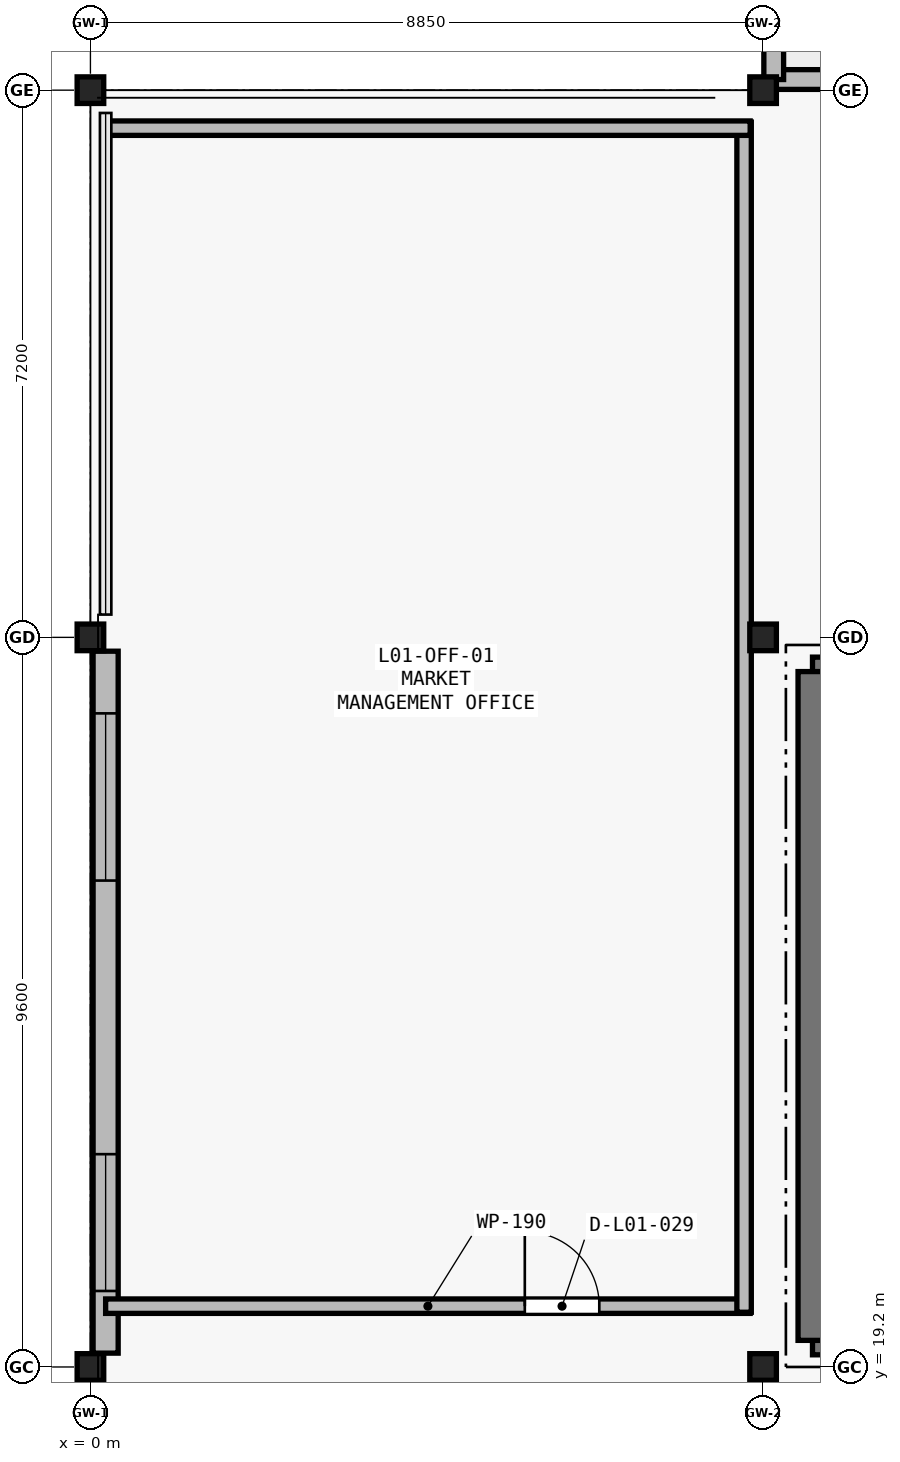
"""IFC4 building model, lengths in metres.
Left out: names, types, materials, properties, quantities, classifications, styles, units other than length and angle.
Written with IfcOpenShell. Run it as: python <this file> out.ifc"""

import sys

from ifc_helpers import new_model, si_unit, direction, frame, frame_2d, origin, origin_2d, place, context, subcontext, project, spatial, rectangle, i_section, extrude, element, fill, save


model = new_model("IFC4")
c1 = context("Model", 3, precision=1e-05, world=origin(), true_north=direction((0.0, 1.0)))
c2 = subcontext(c1, "Body", "Model", "MODEL_VIEW")
j1 = project(units=[si_unit("LENGTHUNIT", "METRE"), si_unit("PLANEANGLEUNIT", "RADIAN")], contexts=[c1])
p1 = place(None, origin())
s1 = spatial("IfcSite", under=j1, at=p1, CompositionType="ELEMENT")
p2 = place(p1, origin())
s2 = spatial("IfcBuilding", under=s1, at=p2, CompositionType="ELEMENT")
p3 = place(p2, frame((0.0, 0.0, 6.0)))
s3 = spatial("IfcBuildingStorey", under=s2, at=p3, CompositionType="ELEMENT", Elevation=6.0)
for number, where, z_axis, x_axis in (
    (1, (0.0, 19.2, 0.0), (0.0, 0.0, 1.0), (1.0, 0.0, 0.0)),
    (2, (0.0, 28.8, 0.0), (0.0, 0.0, 1.0), (1.0, 0.0, 0.0)),
    (3, (0.0, 36.0, 0.0), (0.0, 0.0, 1.0), (1.0, 0.0, 0.0)),
    (4, (8.85, 19.2, 0.0), (0.0, 0.0, 1.0), (1.0, 0.0, 0.0)),
    (5, (8.85, 28.8, 0.0), (0.0, 0.0, 1.0), (1.0, 0.0, 0.0)),
    (6, (8.85, 36.0, 0.0), (0.0, 0.0, 1.0), (1.0, 0.0, 0.0)),
):
    element("IfcColumn", number, at=place(p3, frame(where, z_axis=z_axis, x_axis=x_axis)), inside=s3, PredefinedType="COLUMN", context=c2, shape_type="SweptSolid", body=[
        extrude(i_section(OverallWidth=0.35, OverallDepth=0.35, WebThickness=0.012, FlangeThickness=0.019, FilletRadius=0.02, at=origin_2d()), origin(), (0.0, 0.0, 1.0), 4.8),
    ])
p4 = place(p3, frame((0.2, 19.382, 0.0), z_axis=(0.0, 0.0, 1.0), x_axis=(0.0, 1.0, 0.0)))
e7 = element("IfcWall", 7, at=p4, inside=s3, PredefinedType="SOLIDWALL", context=c2, shape_type="SweptSolid", body=[
    extrude(rectangle(XDim=9.236, YDim=0.33, at=frame_2d((4.618, 0.0))), origin(), (0.0, 0.0, 1.0), 3.95),
])
p5 = place(p4, frame((0.818, 0.0, 0.95)))
e8 = element("IfcOpeningElement", 8, at=p5, cuts=e7, PredefinedType="OPENING", context=c2, shape_type="SweptSolid", body=[
    extrude(rectangle(XDim=1.8, YDim=2.4, at=frame_2d((0.9, 1.2))), frame((0.0, 0.175, 0.0), z_axis=(0.0, -1.0, 0.0), x_axis=(1.0, 0.0, 0.0)), (0.0, 0.0, 1.0), 0.35),
])
p6 = place(p4, frame((6.218, 0.0, 0.95)))
e9 = element("IfcOpeningElement", 9, at=p6, cuts=e7, PredefinedType="OPENING", context=c2, shape_type="SweptSolid", body=[
    extrude(rectangle(XDim=2.2, YDim=2.4, at=frame_2d((1.1, 1.2))), frame((0.0, 0.175, 0.0), z_axis=(0.0, -1.0, 0.0), x_axis=(1.0, 0.0, 0.0)), (0.0, 0.0, 1.0), 0.35),
])
p7 = place(p3, frame((8.99, 36.14, 0.01), z_axis=(0.0, 0.0, 1.0), x_axis=(1.0, 0.0, 0.0)))
e10 = element("IfcWall", 10, at=p7, inside=s3, PredefinedType="PARAPET", context=c2, shape_type="SweptSolid", body=[
    extrude(rectangle(XDim=4.67, YDim=0.26, at=frame_2d((2.335, 0.0))), origin(), (0.0, 0.0, 1.0), 1.15),
])
p8 = place(p3, frame((8.99, 77.86, 0.01), z_axis=(0.0, 0.0, 1.0), x_axis=(0.0, -1.0, 0.0)))
e11 = element("IfcWall", 11, at=p8, inside=s3, PredefinedType="PARAPET", context=c2, shape_type="SweptSolid", body=[
    extrude(rectangle(XDim=41.72, YDim=0.26, at=frame_2d((20.86, 0.0))), origin(), (0.0, 0.0, 1.0), 1.15),
])
p9 = place(p3, frame((9.5, 19.55, 0.0), z_axis=(0.0, 0.0, 1.0), x_axis=(1.0, 0.0, 0.0)))
e12 = element("IfcWall", 12, at=p9, inside=s3, PredefinedType="SHEAR", context=c2, shape_type="SweptSolid", body=[
    extrude(rectangle(XDim=7.55, YDim=0.38, at=frame_2d((3.775, 0.0))), origin(), (0.0, 0.0, 1.0), 4.8),
])
p10 = place(p9, frame((2.25, 0.0, 0.0)))
e13 = element("IfcOpeningElement", 13, at=p10, cuts=e12, PredefinedType="OPENING", context=c2, shape_type="SweptSolid", body=[
    extrude(rectangle(XDim=1.28, YDim=2.15, at=frame_2d((0.64, 1.075))), frame((0.0, 0.2, 0.0), z_axis=(0.0, -1.0, 0.0), x_axis=(1.0, 0.0, 0.0)), (0.0, 0.0, 1.0), 0.4),
])
p11 = place(p3, frame((17.05, 28.35, 0.0), z_axis=(0.0, 0.0, 1.0), x_axis=(-1.0, 0.0, 0.0)))
e14 = element("IfcWall", 14, at=p11, inside=s3, PredefinedType="SHEAR", context=c2, shape_type="SweptSolid", body=[
    extrude(rectangle(XDim=7.55, YDim=0.38, at=frame_2d((3.775, 0.0))), origin(), (0.0, 0.0, 1.0), 4.8),
])
p12 = place(p3, frame((9.5, 28.35, 0.0), z_axis=(0.0, 0.0, 1.0), x_axis=(0.0, -1.0, 0.0)))
e15 = element("IfcWall", 15, at=p12, inside=s3, PredefinedType="SHEAR", context=c2, shape_type="SweptSolid", body=[
    extrude(rectangle(XDim=8.8, YDim=0.38, at=frame_2d((4.4, 0.0))), origin(), (0.0, 0.0, 1.0), 4.8),
])
p13 = place(p3, frame((0.2, 20.0, 0.0), z_axis=(0.0, 0.0, 1.0), x_axis=(1.0, 0.0, 0.0)))
e16 = element("IfcWall", 16, at=p13, inside=s3, PredefinedType="PARTITIONING", context=c2, shape_type="SweptSolid", body=[
    extrude(rectangle(XDim=8.48, YDim=0.19, at=frame_2d((4.24, 0.0))), origin(), (0.0, 0.0, 1.0), 4.32),
])
p14 = place(p13, frame((5.515, 0.0, 0.0)))
e17 = element("IfcOpeningElement", 17, at=p14, cuts=e16, PredefinedType="OPENING", context=c2, shape_type="SweptSolid", body=[
    extrude(rectangle(XDim=0.98, YDim=2.36, at=frame_2d((0.49, 1.18))), frame((0.0, 0.105, 0.0), z_axis=(0.0, -1.0, 0.0), x_axis=(1.0, 0.0, 0.0)), (0.0, 0.0, 1.0), 0.21),
])
p15 = place(p3, frame((8.6, 19.92, 0.0), z_axis=(0.0, 0.0, 1.0), x_axis=(0.0, 1.0, 0.0)))
e18 = element("IfcWall", 18, at=p15, inside=s3, PredefinedType="PARTITIONING", context=c2, shape_type="SweptSolid", body=[
    extrude(rectangle(XDim=15.66, YDim=0.19, at=frame_2d((7.83, 0.0))), origin(), (0.0, 0.0, 1.0), 4.015),
])
p16 = place(p3, frame((8.68, 35.5, 0.0), z_axis=(0.0, 0.0, 1.0), x_axis=(-1.0, 0.0, 0.0)))
e19 = element("IfcWall", 19, at=p16, inside=s3, PredefinedType="PARTITIONING", context=c2, shape_type="SweptSolid", body=[
    extrude(rectangle(XDim=8.48, YDim=0.19, at=frame_2d((4.24, 0.0))), origin(), (0.0, 0.0, 1.0), 4.32),
])
p17 = place(p5, origin())
e20 = element("IfcWindow", 20, at=p17, inside=s3, PartitioningType="SINGLE_PANEL", PredefinedType="WINDOW", context=c2, shape_type="SweptSolid", body=[
    extrude(rectangle(XDim=1.8, YDim=2.4, at=frame_2d((0.9, 1.2))), frame((0.0, 0.03, 0.0), z_axis=(0.0, -1.0, 0.0), x_axis=(1.0, 0.0, 0.0)), (0.0, 0.0, 1.0), 0.06),
])
fill(e8, e20)
p18 = place(p6, origin())
e21 = element("IfcWindow", 21, at=p18, inside=s3, PartitioningType="SINGLE_PANEL", PredefinedType="WINDOW", context=c2, shape_type="SweptSolid", body=[
    extrude(rectangle(XDim=2.2, YDim=2.4, at=frame_2d((1.1, 1.2))), frame((0.0, 0.03, 0.0), z_axis=(0.0, -1.0, 0.0), x_axis=(1.0, 0.0, 0.0)), (0.0, 0.0, 1.0), 0.06),
])
fill(e9, e21)
p19 = place(p14, origin())
e22 = element("IfcDoor", 22, at=p19, inside=s3, OperationType="SINGLE_SWING_LEFT", PredefinedType="DOOR", context=c2, shape_type="SweptSolid", body=[
    extrude(rectangle(XDim=0.98, YDim=2.36, at=frame_2d((0.49, 1.18))), frame((0.0, 0.025, 0.0), z_axis=(0.0, -1.0, 0.0), x_axis=(1.0, 0.0, 0.0)), (0.0, 0.0, 1.0), 0.05),
])
fill(e17, e22)
save(model, sys.argv[1])
